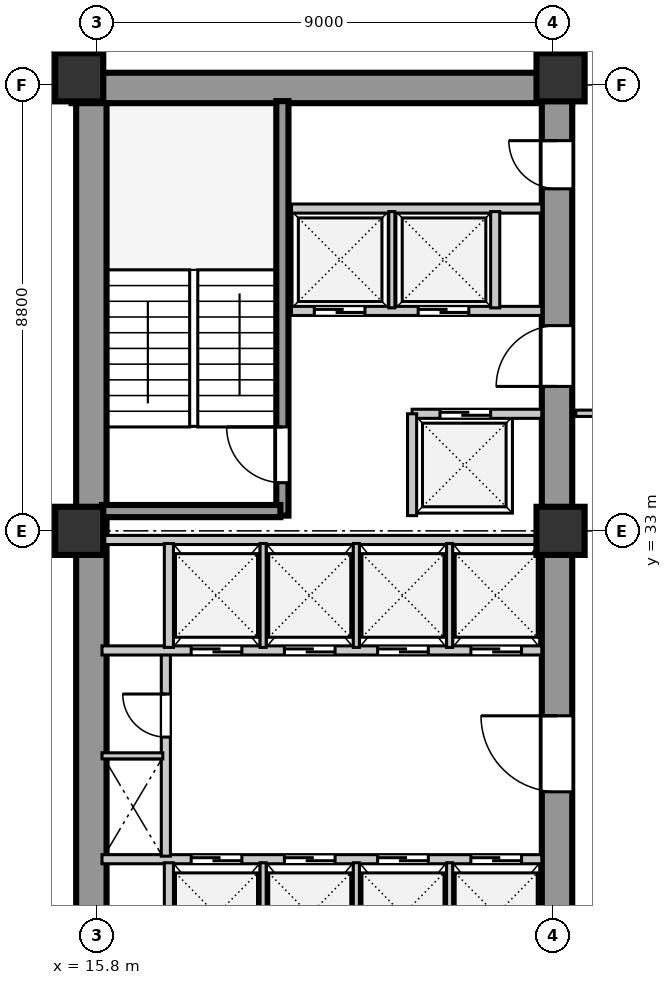
"""IFC4 building model, lengths in metres.
Left out: names, types, materials, properties, quantities, classifications, styles, units other than length and angle.
Written with IfcOpenShell. Run it as: python <this file> out.ifc"""

import sys

from ifc_helpers import new_model, si_unit, direction, frame, frame_2d, origin, origin_2d, place, context, subcontext, project, spatial, rectangle, extrude, element, fill, save


model = new_model("IFC4")
c1 = context("Model", 3, precision=1e-05, world=origin(), true_north=direction((0.0, 1.0)))
c2 = subcontext(c1, "Body", "Model", "MODEL_VIEW")
j1 = project(units=[si_unit("LENGTHUNIT", "METRE"), si_unit("PLANEANGLEUNIT", "RADIAN")], contexts=[c1])
p1 = place(None, origin())
s1 = spatial("IfcSite", under=j1, at=p1, CompositionType="ELEMENT")
p2 = place(p1, origin())
s2 = spatial("IfcBuilding", under=s1, at=p2, CompositionType="ELEMENT")
p3 = place(p2, frame((0.0, 0.0, 90.0)))
s3 = spatial("IfcBuildingStorey", under=s2, at=p3, CompositionType="ELEMENT", Elevation=90.0)
p4 = place(p3, frame((15.3, 41.74, 0.0), z_axis=(0.0, 0.0, 1.0), x_axis=(1.0, 0.0, 0.0)))
e1 = element("IfcWall", 1, at=p4, inside=s3, PredefinedType="SHEAR", context=c2, shape_type="SweptSolid", body=[
    extrude(rectangle(XDim=9.88, YDim=0.6, at=frame_2d((4.94, 0.0))), origin(), (0.0, 0.0, 1.0), 3.7),
])
p5 = place(p3, frame((15.69, 15.81, 0.0), z_axis=(0.0, 0.0, 1.0), x_axis=(0.0, 1.0, 0.0)))
e2 = element("IfcWall", 2, at=p5, inside=s3, PredefinedType="SHEAR", context=c2, shape_type="SweptSolid", body=[
    extrude(rectangle(XDim=25.63, YDim=0.6, at=frame_2d((12.815, 0.0))), origin(), (0.0, 0.0, 1.0), 3.7),
])
p6 = place(p3, frame((24.88, 15.74, 0.0), z_axis=(0.0, 0.0, 1.0), x_axis=(0.0, 1.0, 0.0)))
e3 = element("IfcWall", 3, at=p6, inside=s3, PredefinedType="SHEAR", context=c2, shape_type="SweptSolid", body=[
    extrude(rectangle(XDim=25.76, YDim=0.6, at=frame_2d((12.88, 0.0))), origin(), (0.0, 0.0, 1.0), 3.7),
])
p7 = place(p6, frame((1.61, 0.0, 0.0)))
e4 = element("IfcOpeningElement", 4, at=p7, cuts=e3, PredefinedType="OPENING", context=c2, shape_type="SweptSolid", body=[
    extrude(rectangle(XDim=1.2, YDim=2.1, at=frame_2d((0.6, 1.05))), frame((0.0, 0.31, 0.0), z_axis=(0.0, -1.0, 0.0), x_axis=(1.0, 0.0, 0.0)), (0.0, 0.0, 1.0), 0.62),
])
p8 = place(p6, frame((6.78, 0.0, 0.0)))
e5 = element("IfcOpeningElement", 5, at=p8, cuts=e3, PredefinedType="OPENING", context=c2, shape_type="SweptSolid", body=[
    extrude(rectangle(XDim=0.85, YDim=2.06, at=frame_2d((0.425, 1.03))), frame((0.0, 0.31, 0.0), z_axis=(0.0, -1.0, 0.0), x_axis=(1.0, 0.0, 0.0)), (0.0, 0.0, 1.0), 0.62),
])
p9 = place(p6, frame((12.11, 0.0, 0.0)))
e6 = element("IfcOpeningElement", 6, at=p9, cuts=e3, PredefinedType="OPENING", context=c2, shape_type="SweptSolid", body=[
    extrude(rectangle(XDim=1.5, YDim=2.12, at=frame_2d((0.75, 1.06))), frame((0.0, 0.31, 0.0), z_axis=(0.0, -1.0, 0.0), x_axis=(1.0, 0.0, 0.0)), (0.0, 0.0, 1.0), 0.62),
])
p10 = place(p6, frame((20.11, 0.0, 0.0)))
e7 = element("IfcOpeningElement", 7, at=p10, cuts=e3, PredefinedType="OPENING", context=c2, shape_type="SweptSolid", body=[
    extrude(rectangle(XDim=1.2, YDim=2.12, at=frame_2d((0.6, 1.06))), frame((0.0, 0.31, 0.0), z_axis=(0.0, -1.0, 0.0), x_axis=(1.0, 0.0, 0.0)), (0.0, 0.0, 1.0), 0.62),
])
p11 = place(p6, frame((24.01, 0.0, 0.0)))
e8 = element("IfcOpeningElement", 8, at=p11, cuts=e3, PredefinedType="OPENING", context=c2, shape_type="SweptSolid", body=[
    extrude(rectangle(XDim=0.95, YDim=2.1, at=frame_2d((0.475, 1.05))), frame((0.0, 0.31, 0.0), z_axis=(0.0, -1.0, 0.0), x_axis=(1.0, 0.0, 0.0)), (0.0, 0.0, 1.0), 0.62),
])
for number, where, z_axis, x_axis in (
    (9, (15.45, 33.0, 0.0), (0.0, 0.0, 1.0), (1.0, 0.0, 0.0)),
    (10, (15.45, 41.95, 0.0), (0.0, 0.0, 1.0), (1.0, 0.0, 0.0)),
    (11, (24.95, 33.0, 0.0), (0.0, 0.0, 1.0), (1.0, 0.0, 0.0)),
    (12, (24.95, 41.95, 0.0), (0.0, 0.0, 1.0), (1.0, 0.0, 0.0)),
):
    element("IfcColumn", number, at=place(p3, frame(where, z_axis=z_axis, x_axis=x_axis)), inside=s3, PredefinedType="COLUMN", context=c2, shape_type="SweptSolid", body=[
        extrude(rectangle(XDim=0.95, YDim=0.95, at=origin_2d()), origin(), (0.0, 0.0, 1.0), 3.7),
    ])
p12 = place(p3, frame((15.9, 26.52, 0.0), z_axis=(0.0, 0.0, 1.0), x_axis=(1.0, 0.0, 0.0)))
e13 = element("IfcWall", 13, at=p12, inside=s3, PredefinedType="SOLIDWALL", context=c2, shape_type="SweptSolid", body=[
    extrude(rectangle(XDim=8.68, YDim=0.18, at=frame_2d((4.34, 0.0))), origin(), (0.0, 0.0, 1.0), 3.7),
])
p13 = place(p12, frame((1.76, 0.0, 0.0)))
e14 = element("IfcOpeningElement", 14, at=p13, cuts=e13, PredefinedType="OPENING", context=c2, shape_type="SweptSolid", body=[
    extrude(rectangle(XDim=1.0, YDim=2.1, at=frame_2d((0.5, 1.05))), frame((0.0, 0.1, 0.0), z_axis=(0.0, -1.0, 0.0), x_axis=(1.0, 0.0, 0.0)), (0.0, 0.0, 1.0), 0.2),
])
p14 = place(p12, frame((3.6, 0.0, 0.0)))
e15 = element("IfcOpeningElement", 15, at=p14, cuts=e13, PredefinedType="OPENING", context=c2, shape_type="SweptSolid", body=[
    extrude(rectangle(XDim=1.0, YDim=2.1, at=frame_2d((0.5, 1.05))), frame((0.0, 0.1, 0.0), z_axis=(0.0, -1.0, 0.0), x_axis=(1.0, 0.0, 0.0)), (0.0, 0.0, 1.0), 0.2),
])
p15 = place(p12, frame((5.44, 0.0, 0.0)))
e16 = element("IfcOpeningElement", 16, at=p15, cuts=e13, PredefinedType="OPENING", context=c2, shape_type="SweptSolid", body=[
    extrude(rectangle(XDim=1.0, YDim=2.1, at=frame_2d((0.5, 1.05))), frame((0.0, 0.1, 0.0), z_axis=(0.0, -1.0, 0.0), x_axis=(1.0, 0.0, 0.0)), (0.0, 0.0, 1.0), 0.2),
])
p16 = place(p12, frame((7.28, 0.0, 0.0)))
e17 = element("IfcOpeningElement", 17, at=p16, cuts=e13, PredefinedType="OPENING", context=c2, shape_type="SweptSolid", body=[
    extrude(rectangle(XDim=1.0, YDim=2.1, at=frame_2d((0.5, 1.05))), frame((0.0, 0.1, 0.0), z_axis=(0.0, -1.0, 0.0), x_axis=(1.0, 0.0, 0.0)), (0.0, 0.0, 1.0), 0.2),
])
p17 = place(p3, frame((17.22, 24.4, 0.0), z_axis=(0.0, 0.0, 1.0), x_axis=(0.0, 1.0, 0.0)))
e18 = element("IfcWall", 18, at=p17, inside=s3, PredefinedType="SOLIDWALL", context=c2, shape_type="SweptSolid", body=[
    extrude(rectangle(XDim=2.05, YDim=0.18, at=frame_2d((1.025, 0.0))), origin(), (0.0, 0.0, 1.0), 3.7),
])
for number, where, z_axis, x_axis in (
    (19, (19.08, 24.4, 0.0), (0.0, 0.0, 1.0), (0.0, 1.0, 0.0)),
    (20, (20.92, 24.4, 0.0), (0.0, 0.0, 1.0), (0.0, 1.0, 0.0)),
    (21, (22.76, 24.4, 0.0), (0.0, 0.0, 1.0), (0.0, 1.0, 0.0)),
):
    element("IfcWall", number, at=place(p3, frame(where, z_axis=z_axis, x_axis=x_axis)), inside=s3, PredefinedType="PARTITIONING", context=c2, shape_type="SweptSolid", body=[
        extrude(rectangle(XDim=2.05, YDim=0.12, at=frame_2d((1.025, 0.0))), origin(), (0.0, 0.0, 1.0), 3.7),
    ])
p18 = place(p3, frame((17.16, 26.58, 0.0), z_axis=(0.0, 0.0, 1.0), x_axis=(0.0, 1.0, 0.0)))
e22 = element("IfcWall", 22, at=p18, inside=s3, PredefinedType="SOLIDWALL", context=c2, shape_type="SweptSolid", body=[
    extrude(rectangle(XDim=4.02, YDim=0.18, at=frame_2d((2.01, 0.0))), origin(), (0.0, 0.0, 1.0), 3.7),
])
p19 = place(p18, frame((2.35, 0.0, 0.0)))
e23 = element("IfcOpeningElement", 23, at=p19, cuts=e22, PredefinedType="OPENING", context=c2, shape_type="SweptSolid", body=[
    extrude(rectangle(XDim=0.85, YDim=2.06, at=frame_2d((0.425, 1.03))), frame((0.0, 0.1, 0.0), z_axis=(0.0, -1.0, 0.0), x_axis=(1.0, 0.0, 0.0)), (0.0, 0.0, 1.0), 0.2),
])
p20 = place(p3, frame((15.9, 28.56, 0.0), z_axis=(0.0, 0.0, 1.0), x_axis=(1.0, 0.0, 0.0)))
e24 = element("IfcWall", 24, at=p20, inside=s3, PredefinedType="PARTITIONING", context=c2, shape_type="SweptSolid", body=[
    extrude(rectangle(XDim=1.2, YDim=0.12, at=frame_2d((0.6, 0.0))), origin(), (0.0, 0.0, 1.0), 3.7),
])
p21 = place(p3, frame((15.9, 30.64, 0.0), z_axis=(0.0, 0.0, 1.0), x_axis=(1.0, 0.0, 0.0)))
e25 = element("IfcWall", 25, at=p21, inside=s3, PredefinedType="SOLIDWALL", context=c2, shape_type="SweptSolid", body=[
    extrude(rectangle(XDim=8.68, YDim=0.18, at=frame_2d((4.34, 0.0))), origin(), (0.0, 0.0, 1.0), 3.7),
])
p22 = place(p21, frame((1.76, 0.0, 0.0)))
e26 = element("IfcOpeningElement", 26, at=p22, cuts=e25, PredefinedType="OPENING", context=c2, shape_type="SweptSolid", body=[
    extrude(rectangle(XDim=1.0, YDim=2.1, at=frame_2d((0.5, 1.05))), frame((0.0, 0.1, 0.0), z_axis=(0.0, -1.0, 0.0), x_axis=(1.0, 0.0, 0.0)), (0.0, 0.0, 1.0), 0.2),
])
p23 = place(p21, frame((3.6, 0.0, 0.0)))
e27 = element("IfcOpeningElement", 27, at=p23, cuts=e25, PredefinedType="OPENING", context=c2, shape_type="SweptSolid", body=[
    extrude(rectangle(XDim=1.0, YDim=2.1, at=frame_2d((0.5, 1.05))), frame((0.0, 0.1, 0.0), z_axis=(0.0, -1.0, 0.0), x_axis=(1.0, 0.0, 0.0)), (0.0, 0.0, 1.0), 0.2),
])
p24 = place(p21, frame((5.44, 0.0, 0.0)))
e28 = element("IfcOpeningElement", 28, at=p24, cuts=e25, PredefinedType="OPENING", context=c2, shape_type="SweptSolid", body=[
    extrude(rectangle(XDim=1.0, YDim=2.1, at=frame_2d((0.5, 1.05))), frame((0.0, 0.1, 0.0), z_axis=(0.0, -1.0, 0.0), x_axis=(1.0, 0.0, 0.0)), (0.0, 0.0, 1.0), 0.2),
])
p25 = place(p21, frame((7.28, 0.0, 0.0)))
e29 = element("IfcOpeningElement", 29, at=p25, cuts=e25, PredefinedType="OPENING", context=c2, shape_type="SweptSolid", body=[
    extrude(rectangle(XDim=1.0, YDim=2.1, at=frame_2d((0.5, 1.05))), frame((0.0, 0.1, 0.0), z_axis=(0.0, -1.0, 0.0), x_axis=(1.0, 0.0, 0.0)), (0.0, 0.0, 1.0), 0.2),
])
p26 = place(p3, frame((15.9, 32.82, 0.0), z_axis=(0.0, 0.0, 1.0), x_axis=(1.0, 0.0, 0.0)))
e30 = element("IfcWall", 30, at=p26, inside=s3, PredefinedType="SOLIDWALL", context=c2, shape_type="SweptSolid", body=[
    extrude(rectangle(XDim=8.68, YDim=0.18, at=frame_2d((4.34, 0.0))), origin(), (0.0, 0.0, 1.0), 3.0),
])
p27 = place(p3, frame((17.22, 30.7, 0.0), z_axis=(0.0, 0.0, 1.0), x_axis=(0.0, 1.0, 0.0)))
e31 = element("IfcWall", 31, at=p27, inside=s3, PredefinedType="SOLIDWALL", context=c2, shape_type="SweptSolid", body=[
    extrude(rectangle(XDim=2.05, YDim=0.18, at=frame_2d((1.025, 0.0))), origin(), (0.0, 0.0, 1.0), 3.7),
])
for number, where, z_axis, x_axis in (
    (32, (19.08, 30.7, 0.0), (0.0, 0.0, 1.0), (0.0, 1.0, 0.0)),
    (33, (20.92, 30.7, 0.0), (0.0, 0.0, 1.0), (0.0, 1.0, 0.0)),
    (34, (22.76, 30.7, 0.0), (0.0, 0.0, 1.0), (0.0, 1.0, 0.0)),
):
    element("IfcWall", number, at=place(p3, frame(where, z_axis=z_axis, x_axis=x_axis)), inside=s3, PredefinedType="PARTITIONING", context=c2, shape_type="SweptSolid", body=[
        extrude(rectangle(XDim=2.05, YDim=0.12, at=frame_2d((1.025, 0.0))), origin(), (0.0, 0.0, 1.0), 3.7),
    ])
p28 = place(p3, frame((19.46, 33.3, 0.0), z_axis=(0.0, 0.0, 1.0), x_axis=(0.0, 1.0, 0.0)))
e35 = element("IfcWall", 35, at=p28, inside=s3, PredefinedType="SHEAR", context=c2, shape_type="SweptSolid", body=[
    extrude(rectangle(XDim=8.18, YDim=0.24, at=frame_2d((4.09, 0.0))), origin(), (0.0, 0.0, 1.0), 4.0),
])
p29 = place(p28, frame((0.65, 0.0, 0.0)))
e36 = element("IfcOpeningElement", 36, at=p29, cuts=e35, PredefinedType="OPENING", context=c2, shape_type="SweptSolid", body=[
    extrude(rectangle(XDim=1.1, YDim=2.1, at=frame_2d((0.55, 1.05))), frame((0.0, 0.13, 0.0), z_axis=(0.0, -1.0, 0.0), x_axis=(1.0, 0.0, 0.0)), (0.0, 0.0, 1.0), 0.26),
])
p30 = place(p3, frame((15.9, 33.39, 0.0), z_axis=(0.0, 0.0, 1.0), x_axis=(1.0, 0.0, 0.0)))
e37 = element("IfcWall", 37, at=p30, inside=s3, PredefinedType="SHEAR", context=c2, shape_type="SweptSolid", body=[
    extrude(rectangle(XDim=3.52, YDim=0.24, at=frame_2d((1.76, 0.0))), origin(), (0.0, 0.0, 1.0), 4.0),
])
p31 = place(p3, frame((22.02, 35.31, 0.0), z_axis=(0.0, 0.0, 1.0), x_axis=(1.0, 0.0, 0.0)))
e38 = element("IfcWall", 38, at=p31, inside=s3, PredefinedType="SOLIDWALL", context=c2, shape_type="SweptSolid", body=[
    extrude(rectangle(XDim=2.56, YDim=0.18, at=frame_2d((1.28, 0.0))), origin(), (0.0, 0.0, 1.0), 3.7),
])
p32 = place(p31, frame((0.55, 0.0, 0.0)))
e39 = element("IfcOpeningElement", 39, at=p32, cuts=e38, PredefinedType="OPENING", context=c2, shape_type="SweptSolid", body=[
    extrude(rectangle(XDim=1.0, YDim=2.1, at=frame_2d((0.5, 1.05))), frame((0.0, 0.1, 0.0), z_axis=(0.0, -1.0, 0.0), x_axis=(1.0, 0.0, 0.0)), (0.0, 0.0, 1.0), 0.2),
])
p33 = place(p3, frame((22.02, 33.3, 0.0), z_axis=(0.0, 0.0, 1.0), x_axis=(0.0, 1.0, 0.0)))
e40 = element("IfcWall", 40, at=p33, inside=s3, PredefinedType="SOLIDWALL", context=c2, shape_type="SweptSolid", body=[
    extrude(rectangle(XDim=2.01, YDim=0.18, at=frame_2d((1.005, 0.0))), origin(), (0.0, 0.0, 1.0), 3.7),
])
p34 = place(p3, frame((19.64, 37.34, 0.0), z_axis=(0.0, 0.0, 1.0), x_axis=(1.0, 0.0, 0.0)))
e41 = element("IfcWall", 41, at=p34, inside=s3, PredefinedType="SOLIDWALL", context=c2, shape_type="SweptSolid", body=[
    extrude(rectangle(XDim=4.94, YDim=0.18, at=frame_2d((2.47, 0.0))), origin(), (0.0, 0.0, 1.0), 3.7),
])
p35 = place(p34, frame((0.45, 0.0, 0.0)))
e42 = element("IfcOpeningElement", 42, at=p35, cuts=e41, PredefinedType="OPENING", context=c2, shape_type="SweptSolid", body=[
    extrude(rectangle(XDim=1.0, YDim=2.1, at=frame_2d((0.5, 1.05))), frame((0.0, 0.1, 0.0), z_axis=(0.0, -1.0, 0.0), x_axis=(1.0, 0.0, 0.0)), (0.0, 0.0, 1.0), 0.2),
])
p36 = place(p34, frame((2.5, 0.0, 0.0)))
e43 = element("IfcOpeningElement", 43, at=p36, cuts=e41, PredefinedType="OPENING", context=c2, shape_type="SweptSolid", body=[
    extrude(rectangle(XDim=1.0, YDim=2.1, at=frame_2d((0.5, 1.05))), frame((0.0, 0.1, 0.0), z_axis=(0.0, -1.0, 0.0), x_axis=(1.0, 0.0, 0.0)), (0.0, 0.0, 1.0), 0.2),
])
p37 = place(p3, frame((19.64, 39.36, 0.0), z_axis=(0.0, 0.0, 1.0), x_axis=(1.0, 0.0, 0.0)))
e44 = element("IfcWall", 44, at=p37, inside=s3, PredefinedType="SOLIDWALL", context=c2, shape_type="SweptSolid", body=[
    extrude(rectangle(XDim=4.94, YDim=0.18, at=frame_2d((2.47, 0.0))), origin(), (0.0, 0.0, 1.0), 3.7),
])
p38 = place(p3, frame((21.62, 37.4, 0.0), z_axis=(0.0, 0.0, 1.0), x_axis=(0.0, 1.0, 0.0)))
e45 = element("IfcWall", 45, at=p38, inside=s3, PredefinedType="PARTITIONING", context=c2, shape_type="SweptSolid", body=[
    extrude(rectangle(XDim=1.9, YDim=0.12, at=frame_2d((0.95, 0.0))), origin(), (0.0, 0.0, 1.0), 3.7),
])
p39 = place(p3, frame((23.66, 37.4, 0.0), z_axis=(0.0, 0.0, 1.0), x_axis=(0.0, 1.0, 0.0)))
e46 = element("IfcWall", 46, at=p39, inside=s3, PredefinedType="SOLIDWALL", context=c2, shape_type="SweptSolid", body=[
    extrude(rectangle(XDim=1.9, YDim=0.18, at=frame_2d((0.95, 0.0))), origin(), (0.0, 0.0, 1.0), 3.7),
])
p40 = place(p3, frame((25.25, 35.32, 0.0), z_axis=(0.0, 0.0, 1.0), x_axis=(1.0, 0.0, 0.0)))
e47 = element("IfcWall", 47, at=p40, inside=s3, PredefinedType="PLUMBINGWALL", context=c2, shape_type="SweptSolid", body=[
    extrude(rectangle(XDim=9.47, YDim=0.125, at=frame_2d((4.735, 0.0))), origin(), (0.0, 0.0, 1.0), 3.7),
])
p41 = place(p40, frame((2.125, 0.0, 0.0)))
e48 = element("IfcOpeningElement", 48, at=p41, cuts=e47, PredefinedType="OPENING", context=c2, shape_type="SweptSolid", body=[
    extrude(rectangle(XDim=0.95, YDim=2.08, at=frame_2d((0.475, 1.04))), frame((0.0, 0.073, 0.0), z_axis=(0.0, -1.0, 0.0), x_axis=(1.0, 0.0, 0.0)), (0.0, 0.0, 1.0), 0.145),
])
p42 = place(p40, frame((6.815, 0.0, 0.0)))
e49 = element("IfcOpeningElement", 49, at=p42, cuts=e47, PredefinedType="OPENING", context=c2, shape_type="SweptSolid", body=[
    extrude(rectangle(XDim=0.95, YDim=2.08, at=frame_2d((0.475, 1.04))), frame((0.0, 0.073, 0.0), z_axis=(0.0, -1.0, 0.0), x_axis=(1.0, 0.0, 0.0)), (0.0, 0.0, 1.0), 0.145),
])
p43 = place(p13, origin())
e50 = element("IfcDoor", 50, at=p43, inside=s3, OperationType="DOUBLE_DOOR_SLIDING", PredefinedType="DOOR", context=c2, shape_type="SweptSolid", body=[
    extrude(rectangle(XDim=1.0, YDim=2.1, at=frame_2d((0.5, 1.05))), frame((0.0, 0.025, 0.0), z_axis=(0.0, -1.0, 0.0), x_axis=(1.0, 0.0, 0.0)), (0.0, 0.0, 1.0), 0.05),
])
fill(e14, e50)
p44 = place(p14, origin())
e51 = element("IfcDoor", 51, at=p44, inside=s3, OperationType="DOUBLE_DOOR_SLIDING", PredefinedType="DOOR", context=c2, shape_type="SweptSolid", body=[
    extrude(rectangle(XDim=1.0, YDim=2.1, at=frame_2d((0.5, 1.05))), frame((0.0, 0.025, 0.0), z_axis=(0.0, -1.0, 0.0), x_axis=(1.0, 0.0, 0.0)), (0.0, 0.0, 1.0), 0.05),
])
fill(e15, e51)
p45 = place(p15, origin())
e52 = element("IfcDoor", 52, at=p45, inside=s3, OperationType="DOUBLE_DOOR_SLIDING", PredefinedType="DOOR", context=c2, shape_type="SweptSolid", body=[
    extrude(rectangle(XDim=1.0, YDim=2.1, at=frame_2d((0.5, 1.05))), frame((0.0, 0.025, 0.0), z_axis=(0.0, -1.0, 0.0), x_axis=(1.0, 0.0, 0.0)), (0.0, 0.0, 1.0), 0.05),
])
fill(e16, e52)
p46 = place(p16, origin())
e53 = element("IfcDoor", 53, at=p46, inside=s3, OperationType="DOUBLE_DOOR_SLIDING", PredefinedType="DOOR", context=c2, shape_type="SweptSolid", body=[
    extrude(rectangle(XDim=1.0, YDim=2.1, at=frame_2d((0.5, 1.05))), frame((0.0, 0.025, 0.0), z_axis=(0.0, -1.0, 0.0), x_axis=(1.0, 0.0, 0.0)), (0.0, 0.0, 1.0), 0.05),
])
fill(e17, e53)
p47 = place(p19, origin())
e54 = element("IfcDoor", 54, at=p47, inside=s3, OperationType="SINGLE_SWING_RIGHT", PredefinedType="DOOR", context=c2, shape_type="SweptSolid", body=[
    extrude(rectangle(XDim=0.85, YDim=2.06, at=frame_2d((0.425, 1.03))), frame((0.0, 0.025, 0.0), z_axis=(0.0, -1.0, 0.0), x_axis=(1.0, 0.0, 0.0)), (0.0, 0.0, 1.0), 0.05),
])
fill(e23, e54)
p48 = place(p9, frame((1.5, 0.0, 0.0), z_axis=(0.0, 0.0, 1.0), x_axis=(-1.0, 0.0, 0.0)))
e55 = element("IfcDoor", 55, at=p48, inside=s3, OperationType="SINGLE_SWING_LEFT", PredefinedType="DOOR", context=c2, shape_type="SweptSolid", body=[
    extrude(rectangle(XDim=1.5, YDim=2.12, at=frame_2d((0.75, 1.06))), frame((0.0, 0.025, 0.0), z_axis=(0.0, -1.0, 0.0), x_axis=(1.0, 0.0, 0.0)), (0.0, 0.0, 1.0), 0.05),
])
fill(e6, e55)
p49 = place(p22, frame((1.0, 0.0, 0.0), z_axis=(0.0, 0.0, 1.0), x_axis=(-1.0, 0.0, 0.0)))
e56 = element("IfcDoor", 56, at=p49, inside=s3, OperationType="DOUBLE_DOOR_SLIDING", PredefinedType="DOOR", context=c2, shape_type="SweptSolid", body=[
    extrude(rectangle(XDim=1.0, YDim=2.1, at=frame_2d((0.5, 1.05))), frame((0.0, 0.025, 0.0), z_axis=(0.0, -1.0, 0.0), x_axis=(1.0, 0.0, 0.0)), (0.0, 0.0, 1.0), 0.05),
])
fill(e26, e56)
p50 = place(p23, frame((1.0, 0.0, 0.0), z_axis=(0.0, 0.0, 1.0), x_axis=(-1.0, 0.0, 0.0)))
e57 = element("IfcDoor", 57, at=p50, inside=s3, OperationType="DOUBLE_DOOR_SLIDING", PredefinedType="DOOR", context=c2, shape_type="SweptSolid", body=[
    extrude(rectangle(XDim=1.0, YDim=2.1, at=frame_2d((0.5, 1.05))), frame((0.0, 0.025, 0.0), z_axis=(0.0, -1.0, 0.0), x_axis=(1.0, 0.0, 0.0)), (0.0, 0.0, 1.0), 0.05),
])
fill(e27, e57)
p51 = place(p24, frame((1.0, 0.0, 0.0), z_axis=(0.0, 0.0, 1.0), x_axis=(-1.0, 0.0, 0.0)))
e58 = element("IfcDoor", 58, at=p51, inside=s3, OperationType="DOUBLE_DOOR_SLIDING", PredefinedType="DOOR", context=c2, shape_type="SweptSolid", body=[
    extrude(rectangle(XDim=1.0, YDim=2.1, at=frame_2d((0.5, 1.05))), frame((0.0, 0.025, 0.0), z_axis=(0.0, -1.0, 0.0), x_axis=(1.0, 0.0, 0.0)), (0.0, 0.0, 1.0), 0.05),
])
fill(e28, e58)
p52 = place(p25, frame((1.0, 0.0, 0.0), z_axis=(0.0, 0.0, 1.0), x_axis=(-1.0, 0.0, 0.0)))
e59 = element("IfcDoor", 59, at=p52, inside=s3, OperationType="DOUBLE_DOOR_SLIDING", PredefinedType="DOOR", context=c2, shape_type="SweptSolid", body=[
    extrude(rectangle(XDim=1.0, YDim=2.1, at=frame_2d((0.5, 1.05))), frame((0.0, 0.025, 0.0), z_axis=(0.0, -1.0, 0.0), x_axis=(1.0, 0.0, 0.0)), (0.0, 0.0, 1.0), 0.05),
])
fill(e29, e59)
p53 = place(p29, origin())
e60 = element("IfcDoor", 60, at=p53, inside=s3, OperationType="SINGLE_SWING_RIGHT", PredefinedType="DOOR", context=c2, shape_type="SweptSolid", body=[
    extrude(rectangle(XDim=1.1, YDim=2.1, at=frame_2d((0.55, 1.05))), frame((0.0, 0.025, 0.0), z_axis=(0.0, -1.0, 0.0), x_axis=(1.0, 0.0, 0.0)), (0.0, 0.0, 1.0), 0.05),
])
fill(e36, e60)
p54 = place(p10, frame((1.2, 0.0, 0.0), z_axis=(0.0, 0.0, 1.0), x_axis=(-1.0, 0.0, 0.0)))
e61 = element("IfcDoor", 61, at=p54, inside=s3, OperationType="SINGLE_SWING_RIGHT", PredefinedType="DOOR", context=c2, shape_type="SweptSolid", body=[
    extrude(rectangle(XDim=1.2, YDim=2.12, at=frame_2d((0.6, 1.06))), frame((0.0, 0.025, 0.0), z_axis=(0.0, -1.0, 0.0), x_axis=(1.0, 0.0, 0.0)), (0.0, 0.0, 1.0), 0.05),
])
fill(e7, e61)
p55 = place(p35, frame((1.0, 0.0, 0.0), z_axis=(0.0, 0.0, 1.0), x_axis=(-1.0, 0.0, 0.0)))
e62 = element("IfcDoor", 62, at=p55, inside=s3, OperationType="DOUBLE_DOOR_SLIDING", PredefinedType="DOOR", context=c2, shape_type="SweptSolid", body=[
    extrude(rectangle(XDim=1.0, YDim=2.1, at=frame_2d((0.5, 1.05))), frame((0.0, 0.025, 0.0), z_axis=(0.0, -1.0, 0.0), x_axis=(1.0, 0.0, 0.0)), (0.0, 0.0, 1.0), 0.05),
])
fill(e42, e62)
p56 = place(p36, frame((1.0, 0.0, 0.0), z_axis=(0.0, 0.0, 1.0), x_axis=(-1.0, 0.0, 0.0)))
e63 = element("IfcDoor", 63, at=p56, inside=s3, OperationType="DOUBLE_DOOR_SLIDING", PredefinedType="DOOR", context=c2, shape_type="SweptSolid", body=[
    extrude(rectangle(XDim=1.0, YDim=2.1, at=frame_2d((0.5, 1.05))), frame((0.0, 0.025, 0.0), z_axis=(0.0, -1.0, 0.0), x_axis=(1.0, 0.0, 0.0)), (0.0, 0.0, 1.0), 0.05),
])
fill(e43, e63)
p57 = place(p32, origin())
e64 = element("IfcDoor", 64, at=p57, inside=s3, OperationType="DOUBLE_DOOR_SLIDING", PredefinedType="DOOR", context=c2, shape_type="SweptSolid", body=[
    extrude(rectangle(XDim=1.0, YDim=2.1, at=frame_2d((0.5, 1.05))), frame((0.0, 0.025, 0.0), z_axis=(0.0, -1.0, 0.0), x_axis=(1.0, 0.0, 0.0)), (0.0, 0.0, 1.0), 0.05),
])
fill(e39, e64)
p58 = place(p11, frame((0.95, 0.0, 0.0), z_axis=(0.0, 0.0, 1.0), x_axis=(-1.0, 0.0, 0.0)))
e65 = element("IfcDoor", 65, at=p58, inside=s3, OperationType="SINGLE_SWING_LEFT", PredefinedType="DOOR", context=c2, shape_type="SweptSolid", body=[
    extrude(rectangle(XDim=0.95, YDim=2.1, at=frame_2d((0.475, 1.05))), frame((0.0, 0.025, 0.0), z_axis=(0.0, -1.0, 0.0), x_axis=(1.0, 0.0, 0.0)), (0.0, 0.0, 1.0), 0.05),
])
fill(e8, e65)
save(model, sys.argv[1])
